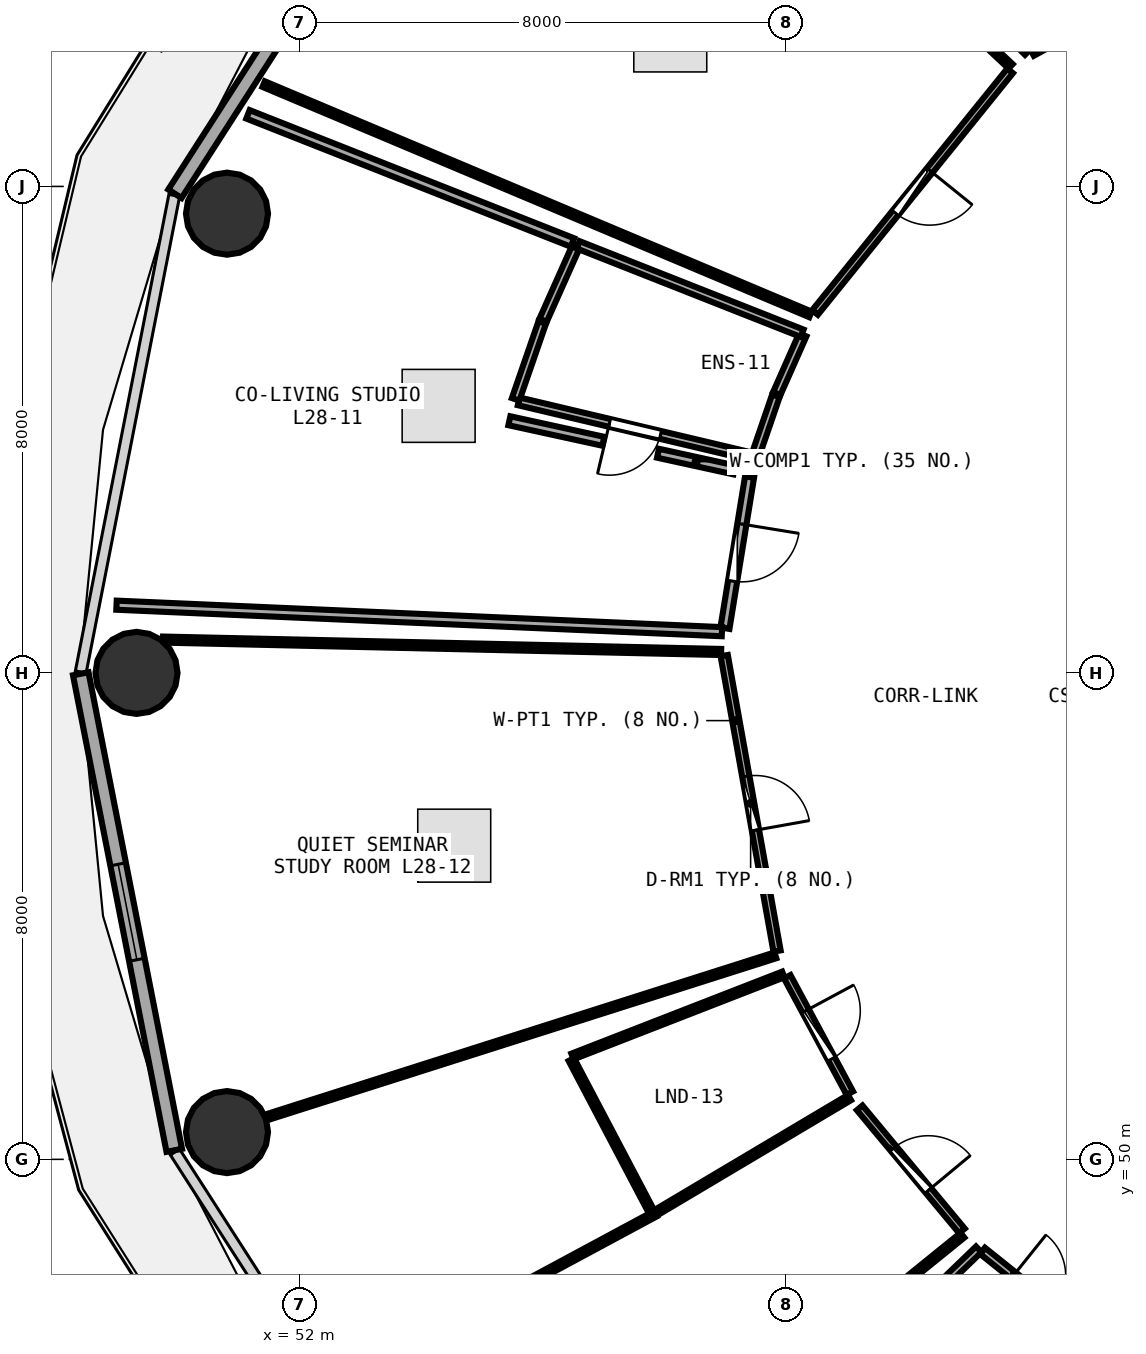
"""IFC4 building model, lengths in metres.
Left out: names, types, materials, properties, quantities, classifications, styles, units other than length and angle.
Written with IfcOpenShell. Run it as: python <this file> out.ifc"""

import sys

from ifc_helpers import new_model, si_unit, direction, frame, frame_2d, origin, origin_2d, place, context, subcontext, project, spatial, rectangle, circle, extrude, element, fill, save


model = new_model("IFC4")
c1 = context("Model", 3, precision=1e-05, world=origin(), true_north=direction((0.0, 1.0)))
c2 = subcontext(c1, "Body", "Model", "MODEL_VIEW")
j1 = project(units=[si_unit("LENGTHUNIT", "METRE"), si_unit("PLANEANGLEUNIT", "RADIAN")], contexts=[c1])
p1 = place(None, origin())
s1 = spatial("IfcSite", under=j1, at=p1, CompositionType="ELEMENT")
p2 = place(p1, origin())
s2 = spatial("IfcBuilding", under=s1, at=p2, CompositionType="ELEMENT")
p3 = place(p2, frame((0.0, 0.0, 110.1)))
s3 = spatial("IfcBuildingStorey", under=s2, at=p3, CompositionType="ELEMENT", Elevation=110.1)
for number, where, z_axis, x_axis in (
    (1, (50.808, 65.552, 0.0), (0.0, 0.0, 1.0), (1.0, 0.0, 0.0)),
    (2, (49.32, 58.0, 0.0), (0.0, 0.0, 1.0), (1.0, 0.0, 0.0)),
    (3, (50.808, 50.448, 0.0), (0.0, 0.0, 1.0), (1.0, 0.0, 0.0)),
):
    element("IfcColumn", number, at=place(p3, frame(where, z_axis=z_axis, x_axis=x_axis)), inside=s3, PredefinedType="COLUMN", context=c2, shape_type="SweptSolid", body=[
        extrude(circle(Radius=0.675, at=origin_2d()), origin(), (0.0, 0.0, 1.0), 3.75),
    ])
p4 = place(p3, frame((54.381, 72.771, 0.0), z_axis=(0.0, 0.0, 1.0), x_axis=(-0.540620528459, -0.841266571432, 0.0)))
e4 = element("IfcWall", 4, at=p4, inside=s3, PredefinedType="SOLIDWALL", context=c2, shape_type="SweptSolid", body=[
    extrude(rectangle(XDim=8.193, YDim=0.26, at=frame_2d((4.096, 0.0))), origin(), (0.0, 0.0, 1.0), 3.475),
])
p5 = place(p4, frame((3.621, 0.0, 0.0)))
e5 = element("IfcOpeningElement", 5, at=p5, cuts=e4, PredefinedType="OPENING", context=c2, shape_type="SweptSolid", body=[
    extrude(rectangle(XDim=0.95, YDim=2.1, at=frame_2d((0.475, 1.05))), frame((0.0, 0.14, 0.0), z_axis=(0.0, -1.0, 0.0), x_axis=(1.0, 0.0, 0.0)), (0.0, 0.0, 1.0), 0.28),
])
p6 = place(p4, frame((2.041, 0.0, 0.85)))
e6 = element("IfcOpeningElement", 6, at=p6, cuts=e4, PredefinedType="OPENING", context=c2, shape_type="SweptSolid", body=[
    extrude(rectangle(XDim=1.2, YDim=1.45, at=frame_2d((0.6, 0.725))), frame((0.0, 0.14, 0.0), z_axis=(0.0, -1.0, 0.0), x_axis=(1.0, 0.0, 0.0)), (0.0, 0.0, 1.0), 0.28),
])
p7 = place(p3, frame((48.403, 57.985, 0.0), z_axis=(0.0, 0.0, 1.0), x_axis=(0.192581843632, -0.981280914674, 0.0)))
e7 = element("IfcWall", 7, at=p7, inside=s3, PredefinedType="SOLIDWALL", context=c2, shape_type="SweptSolid", body=[
    extrude(rectangle(XDim=7.987, YDim=0.26, at=frame_2d((3.993, 0.0))), origin(), (0.0, 0.0, 1.0), 3.475),
])
p8 = place(p7, frame((3.193, 0.0, 0.85)))
e8 = element("IfcOpeningElement", 8, at=p8, cuts=e7, PredefinedType="OPENING", context=c2, shape_type="SweptSolid", body=[
    extrude(rectangle(XDim=1.6, YDim=1.45, at=frame_2d((0.8, 0.725))), frame((0.0, 0.14, 0.0), z_axis=(0.0, -1.0, 0.0), x_axis=(1.0, 0.0, 0.0)), (0.0, 0.0, 1.0), 0.28),
])
p9 = place(p3, frame((68.704, 70.745, 0.0), z_axis=(0.0, 0.0, 1.0), x_axis=(-0.877504886901, -0.479567694351, 0.0)))
e9 = element("IfcWall", 9, at=p9, inside=s3, PredefinedType="PARTITIONING", context=c2, shape_type="SweptSolid", body=[
    extrude(rectangle(XDim=5.306, YDim=0.12, at=frame_2d((2.653, 0.0))), origin(), (0.0, 0.0, 1.0), 2.925),
])
p10 = place(p9, frame((2.203, 0.0, 0.0)))
e10 = element("IfcOpeningElement", 10, at=p10, cuts=e9, PredefinedType="OPENING", context=c2, shape_type="SweptSolid", body=[
    extrude(rectangle(XDim=0.9, YDim=2.08, at=frame_2d((0.45, 1.04))), frame((0.0, 0.07, 0.0), z_axis=(0.0, -1.0, 0.0), x_axis=(1.0, 0.0, 0.0)), (0.0, 0.0, 1.0), 0.14),
])
p11 = place(p3, frame((63.687, 67.9, 0.0), z_axis=(0.0, 0.0, 1.0), x_axis=(-0.628221381111, -0.778034636963, 0.0)))
e11 = element("IfcWall", 11, at=p11, inside=s3, PredefinedType="PARTITIONING", context=c2, shape_type="SweptSolid", body=[
    extrude(rectangle(XDim=5.107, YDim=0.12, at=frame_2d((2.554, 0.0))), origin(), (0.0, 0.0, 1.0), 2.925),
])
p12 = place(p11, frame((2.104, 0.0, 0.0)))
e12 = element("IfcOpeningElement", 12, at=p12, cuts=e11, PredefinedType="OPENING", context=c2, shape_type="SweptSolid", body=[
    extrude(rectangle(XDim=0.9, YDim=2.08, at=frame_2d((0.45, 1.04))), frame((0.0, 0.07, 0.0), z_axis=(0.0, -1.0, 0.0), x_axis=(1.0, 0.0, 0.0)), (0.0, 0.0, 1.0), 0.14),
])
p13 = place(p3, frame((59.43, 61.56, 0.0), z_axis=(0.0, 0.0, 1.0), x_axis=(-0.97309348784, 0.230410641948, 0.0)))
e13 = element("IfcWall", 13, at=p13, inside=s3, PredefinedType="PLUMBINGWALL", context=c2, shape_type="SweptSolid", body=[
    extrude(rectangle(XDim=3.929, YDim=0.13, at=frame_2d((1.964, 0.0))), origin(), (0.0, 0.0, 1.0), 3.175),
])
p14 = place(p13, frame((1.534, 0.0, 0.0)))
e14 = element("IfcOpeningElement", 14, at=p14, cuts=e13, PredefinedType="OPENING", context=c2, shape_type="SweptSolid", body=[
    extrude(rectangle(XDim=0.86, YDim=2.05, at=frame_2d((0.43, 1.025))), frame((0.0, 0.075, 0.0), z_axis=(0.0, -1.0, 0.0), x_axis=(1.0, 0.0, 0.0)), (0.0, 0.0, 1.0), 0.15),
])
p15 = place(p3, frame((59.402, 61.222, 0.0), z_axis=(0.0, 0.0, 1.0), x_axis=(-0.16067340659, -0.987007627334, 0.0)))
e15 = element("IfcWall", 15, at=p15, inside=s3, PredefinedType="PARTITIONING", context=c2, shape_type="SweptSolid", body=[
    extrude(rectangle(XDim=2.519, YDim=0.15, at=frame_2d((1.26, 0.0))), origin(), (0.0, 0.0, 1.0), 3.48),
])
p16 = place(p15, frame((0.785, 0.0, 0.0)))
e16 = element("IfcOpeningElement", 16, at=p16, cuts=e15, PredefinedType="OPENING", context=c2, shape_type="SweptSolid", body=[
    extrude(rectangle(XDim=0.95, YDim=2.08, at=frame_2d((0.475, 1.04))), frame((0.0, 0.085, 0.0), z_axis=(0.0, -1.0, 0.0), x_axis=(1.0, 0.0, 0.0)), (0.0, 0.0, 1.0), 0.17),
])
p17 = place(p3, frame((58.986, 58.284, 0.0), z_axis=(0.0, 0.0, 1.0), x_axis=(0.17606801269, -0.984378004075, 0.0)))
e17 = element("IfcWall", 17, at=p17, inside=s3, PredefinedType="PARTITIONING", context=c2, shape_type="SweptSolid", body=[
    extrude(rectangle(XDim=4.935, YDim=0.12, at=frame_2d((2.468, 0.0))), origin(), (0.0, 0.0, 1.0), 2.925),
])
p18 = place(p17, frame((2.017, 0.0, 0.0)))
e18 = element("IfcOpeningElement", 18, at=p18, cuts=e17, PredefinedType="OPENING", context=c2, shape_type="SweptSolid", body=[
    extrude(rectangle(XDim=0.9, YDim=2.08, at=frame_2d((0.45, 1.04))), frame((0.0, 0.07, 0.0), z_axis=(0.0, -1.0, 0.0), x_axis=(1.0, 0.0, 0.0)), (0.0, 0.0, 1.0), 0.14),
])
p19 = place(p3, frame((60.022, 53.002, 0.0), z_axis=(0.0, 0.0, 1.0), x_axis=(0.473670876771, -0.880701936241, 0.0)))
e19 = element("IfcWall", 19, at=p19, inside=s3, PredefinedType="PARTITIONING", context=c2, shape_type="SweptSolid", body=[
    extrude(rectangle(XDim=2.173, YDim=0.12, at=frame_2d((1.086, 0.0))), origin(), (0.0, 0.0, 1.0), 3.235),
])
p20 = place(p19, frame((0.636, 0.0, 0.0)))
e20 = element("IfcOpeningElement", 20, at=p20, cuts=e19, PredefinedType="OPENING", context=c2, shape_type="SweptSolid", body=[
    extrude(rectangle(XDim=0.9, YDim=2.08, at=frame_2d((0.45, 1.04))), frame((0.0, 0.07, 0.0), z_axis=(0.0, -1.0, 0.0), x_axis=(1.0, 0.0, 0.0)), (0.0, 0.0, 1.0), 0.14),
])
p21 = place(p3, frame((61.213, 50.847, 0.0), z_axis=(0.0, 0.0, 1.0), x_axis=(0.639180120379, -0.769057067916, 0.0)))
e21 = element("IfcWall", 21, at=p21, inside=s3, PredefinedType="PARTITIONING", context=c2, shape_type="SweptSolid", body=[
    extrude(rectangle(XDim=2.632, YDim=0.12, at=frame_2d((1.316, 0.0))), origin(), (0.0, 0.0, 1.0), 2.925),
])
p22 = place(p21, frame((0.866, 0.0, 0.0)))
e22 = element("IfcOpeningElement", 22, at=p22, cuts=e21, PredefinedType="OPENING", context=c2, shape_type="SweptSolid", body=[
    extrude(rectangle(XDim=0.9, YDim=2.08, at=frame_2d((0.45, 1.04))), frame((0.0, 0.07, 0.0), z_axis=(0.0, -1.0, 0.0), x_axis=(1.0, 0.0, 0.0)), (0.0, 0.0, 1.0), 0.14),
])
p23 = place(p3, frame((63.233, 48.497, 0.0), z_axis=(0.0, 0.0, 1.0), x_axis=(0.780097789407, -0.625657605214, 0.0)))
e23 = element("IfcWall", 23, at=p23, inside=s3, PredefinedType="PLUMBINGWALL", context=c2, shape_type="SweptSolid", body=[
    extrude(rectangle(XDim=2.164, YDim=0.13, at=frame_2d((1.082, 0.0))), origin(), (0.0, 0.0, 1.0), 2.925),
])
p24 = place(p23, frame((0.652, 0.0, 0.0)))
e24 = element("IfcOpeningElement", 24, at=p24, cuts=e23, PredefinedType="OPENING", context=c2, shape_type="SweptSolid", body=[
    extrude(rectangle(XDim=0.86, YDim=2.05, at=frame_2d((0.43, 1.025))), frame((0.0, 0.075, 0.0), z_axis=(0.0, -1.0, 0.0), x_axis=(1.0, 0.0, 0.0)), (0.0, 0.0, 1.0), 0.15),
])
p25 = place(p3, frame((63.968, 68.2, 0.0), z_axis=(0.0, 0.0, 1.0), x_axis=(-0.711571842372, 0.702613345406, 0.0)))
e25 = element("IfcWall", 25, at=p25, inside=s3, PredefinedType="PARTITIONING", context=c2, shape_type="SweptSolid", body=[
    extrude(rectangle(XDim=9.32, YDim=0.1, at=frame_2d((4.66, 0.0))), origin(), (0.0, 0.0, 1.0), 2.975),
])
p26 = place(p3, frame((60.404, 63.896, 0.0), z_axis=(0.0, 0.0, 1.0), x_axis=(-0.921616535876, 0.388101740268, 0.0)))
e26 = element("IfcWall", 26, at=p26, inside=s3, PredefinedType="PARTITIONING", context=c2, shape_type="SweptSolid", body=[
    extrude(rectangle(XDim=9.758, YDim=0.1, at=frame_2d((4.879, 0.0))), origin(), (0.0, 0.0, 1.0), 2.925),
])
p27 = place(p3, frame((56.883, 74.379, 0.0), z_axis=(0.0, 0.0, 1.0), x_axis=(0.728610729356, -0.684928029115, 0.0)))
e27 = element("IfcWall", 27, at=p27, inside=s3, PredefinedType="PARTITIONING", context=c2, shape_type="SweptSolid", body=[
    extrude(rectangle(XDim=9.35, YDim=0.1, at=frame_2d((4.675, 0.0))), origin(), (0.0, 0.0, 1.0), 2.975),
])
p28 = place(p3, frame((60.278, 63.56, 0.0), z_axis=(0.0, 0.0, 1.0), x_axis=(-0.405022792184, -0.91430658852, 0.0)))
e28 = element("IfcWall", 28, at=p28, inside=s3, PredefinedType="PLUMBINGWALL", context=c2, shape_type="SweptSolid", body=[
    extrude(rectangle(XDim=1.056, YDim=0.13, at=frame_2d((0.528, 0.0))), origin(), (0.0, 0.0, 1.0), 3.235),
])
p29 = place(p3, frame((59.835, 62.557, 0.0), z_axis=(0.0, 0.0, 1.0), x_axis=(-0.325079768511, -0.945686599305, 0.0)))
e29 = element("IfcWall", 29, at=p29, inside=s3, PredefinedType="PLUMBINGWALL", context=c2, shape_type="SweptSolid", body=[
    extrude(rectangle(XDim=1.049, YDim=0.13, at=frame_2d((0.524, 0.0))), origin(), (0.0, 0.0, 1.0), 3.48),
])
p30 = place(p3, frame((55.554, 62.498, 0.0), z_axis=(0.0, 0.0, 1.0), x_axis=(0.327317350081, 0.944914468265, 0.0)))
e30 = element("IfcWall", 30, at=p30, inside=s3, PredefinedType="PLUMBINGWALL", context=c2, shape_type="SweptSolid", body=[
    extrude(rectangle(XDim=1.338, YDim=0.13, at=frame_2d((0.669, 0.0))), origin(), (0.0, 0.0, 1.0), 3.48),
])
p31 = place(p3, frame((56.007, 63.799, 0.0), z_axis=(0.0, 0.0, 1.0), x_axis=(0.407618441725, 0.913152345431, 0.0)))
e31 = element("IfcWall", 31, at=p31, inside=s3, PredefinedType="PLUMBINGWALL", context=c2, shape_type="SweptSolid", body=[
    extrude(rectangle(XDim=1.346, YDim=0.13, at=frame_2d((0.673, 0.0))), origin(), (0.0, 0.0, 1.0), 3.48),
])
p32 = place(p3, frame((56.583, 65.04, 0.0), z_axis=(0.0, 0.0, 1.0), x_axis=(0.930150236363, -0.367179163072, 0.0)))
e32 = element("IfcWall", 32, at=p32, inside=s3, PredefinedType="PLUMBINGWALL", context=c2, shape_type="SweptSolid", body=[
    extrude(rectangle(XDim=3.961, YDim=0.13, at=frame_2d((1.981, 0.0))), origin(), (0.0, 0.0, 1.0), 3.175),
])
p33 = place(p3, frame((58.948, 58.678, 0.0), z_axis=(0.0, 0.0, 1.0), x_axis=(-0.999044661294, 0.043700855133, 0.0)))
e33 = element("IfcWall", 33, at=p33, inside=s3, PredefinedType="PARTITIONING", context=c2, shape_type="SweptSolid", body=[
    extrude(rectangle(XDim=9.967, YDim=0.15, at=frame_2d((4.983, 0.0))), origin(), (0.0, 0.0, 1.0), 2.975),
])
p34 = place(p3, frame((51.153, 67.185, 0.0), z_axis=(0.0, 0.0, 1.0), x_axis=(0.930084837922, -0.367344789358, 0.0)))
e34 = element("IfcWall", 34, at=p34, inside=s3, PredefinedType="PARTITIONING", context=c2, shape_type="SweptSolid", body=[
    extrude(rectangle(XDim=5.738, YDim=0.15, at=frame_2d((2.869, 0.0))), origin(), (0.0, 0.0, 1.0), 2.925),
])
p35 = place(p3, frame((55.452, 62.146, 0.0), z_axis=(0.0, 0.0, 1.0), x_axis=(0.976922162328, -0.213595619694, 0.0)))
e35 = element("IfcWall", 35, at=p35, inside=s3, PredefinedType="PARTITIONING", context=c2, shape_type="SweptSolid", body=[
    extrude(rectangle(XDim=1.582, YDim=0.15, at=frame_2d((0.791, 0.0))), origin(), (0.0, 0.0, 1.0), 3.175),
])
p36 = place(p3, frame((57.896, 61.612, 0.0), z_axis=(0.0, 0.0, 1.0), x_axis=(0.976918594425, -0.213611937556, 0.0)))
e36 = element("IfcWall", 36, at=p36, inside=s3, PredefinedType="PARTITIONING", context=c2, shape_type="SweptSolid", body=[
    extrude(rectangle(XDim=1.286, YDim=0.15, at=frame_2d((0.643, 0.0))), origin(), (0.0, 0.0, 1.0), 3.48),
])
p37 = place(p3, frame((59.827, 53.355, 0.0), z_axis=(0.0, 0.0, 1.0), x_axis=(-0.952909703193, -0.30325417979, 0.0)))
e37 = element("IfcWall", 37, at=p37, inside=s3, PredefinedType="PARTITIONING", context=c2, shape_type="SweptSolid", body=[
    extrude(rectangle(XDim=8.776, YDim=0.1, at=frame_2d((4.388, 0.0))), origin(), (0.0, 0.0, 1.0), 3.175),
])
p38 = place(p3, frame((49.756, 58.548, 0.0), z_axis=(0.0, 0.0, 1.0), x_axis=(0.999754056426, -0.022177165281, 0.0)))
e38 = element("IfcWall", 38, at=p38, inside=s3, PredefinedType="PARTITIONING", context=c2, shape_type="SweptSolid", body=[
    extrude(rectangle(XDim=9.181, YDim=0.1, at=frame_2d((4.591, 0.0))), origin(), (0.0, 0.0, 1.0), 3.175),
])
p39 = place(p3, frame((61.046, 51.016, 0.0), z_axis=(0.0, 0.0, 1.0), x_axis=(-0.859598985467, -0.510969259529, 0.0)))
e39 = element("IfcWall", 39, at=p39, inside=s3, PredefinedType="PARTITIONING", context=c2, shape_type="SweptSolid", body=[
    extrude(rectangle(XDim=3.721, YDim=0.1, at=frame_2d((1.86, 0.0))), origin(), (0.0, 0.0, 1.0), 2.925),
])
p40 = place(p3, frame((57.794, 49.129, 0.0), z_axis=(0.0, 0.0, 1.0), x_axis=(-0.465895277078, 0.884839867319, 0.0)))
e40 = element("IfcWall", 40, at=p40, inside=s3, PredefinedType="PARTITIONING", context=c2, shape_type="SweptSolid", body=[
    extrude(rectangle(XDim=2.839, YDim=0.1, at=frame_2d((1.419, 0.0))), origin(), (0.0, 0.0, 1.0), 2.925),
])
p41 = place(p3, frame((56.49, 51.691, 0.0), z_axis=(0.0, 0.0, 1.0), x_axis=(0.931912263443, 0.362683792365, 0.0)))
e41 = element("IfcWall", 41, at=p41, inside=s3, PredefinedType="PARTITIONING", context=c2, shape_type="SweptSolid", body=[
    extrude(rectangle(XDim=3.72, YDim=0.1, at=frame_2d((1.86, 0.0))), origin(), (0.0, 0.0, 1.0), 3.175),
])
p42 = place(p3, frame((62.903, 48.752, 0.0), z_axis=(0.0, 0.0, 1.0), x_axis=(-0.777323765608, -0.629100757766, 0.0)))
e42 = element("IfcWall", 42, at=p42, inside=s3, PredefinedType="PARTITIONING", context=c2, shape_type="SweptSolid", body=[
    extrude(rectangle(XDim=9.44, YDim=0.1, at=frame_2d((4.72, 0.0))), origin(), (0.0, 0.0, 1.0), 2.925),
])
p43 = place(p3, frame((52.634, 46.298, 0.0), z_axis=(0.0, 0.0, 1.0), x_axis=(0.880653600526, 0.473760736956, 0.0)))
e43 = element("IfcWall", 43, at=p43, inside=s3, PredefinedType="PARTITIONING", context=c2, shape_type="SweptSolid", body=[
    extrude(rectangle(XDim=5.926, YDim=0.1, at=frame_2d((2.963, 0.0))), origin(), (0.0, 0.0, 1.0), 2.975),
])
p44 = place(p3, frame((60.753, 46.187, 0.0), z_axis=(0.0, 0.0, 1.0), x_axis=(0.719671825867, 0.694314383441, 0.0)))
e44 = element("IfcWall", 44, at=p44, inside=s3, PredefinedType="PLUMBINGWALL", context=c2, shape_type="SweptSolid", body=[
    extrude(rectangle(XDim=3.36, YDim=0.13, at=frame_2d((1.68, 0.0))), origin(), (0.0, 0.0, 1.0), 3.235),
])
p45 = place(p8, origin())
e45 = element("IfcWindow", 45, at=p45, inside=s3, PartitioningType="SINGLE_PANEL", PredefinedType="WINDOW", context=c2, shape_type="SweptSolid", body=[
    extrude(rectangle(XDim=1.6, YDim=1.45, at=frame_2d((0.8, 0.725))), frame((0.0, 0.03, 0.0), z_axis=(0.0, -1.0, 0.0), x_axis=(1.0, 0.0, 0.0)), (0.0, 0.0, 1.0), 0.06),
])
fill(e8, e45)
p46 = place(p12, origin())
e46 = element("IfcDoor", 46, at=p46, inside=s3, OperationType="SINGLE_SWING_LEFT", PredefinedType="DOOR", context=c2, shape_type="SweptSolid", body=[
    extrude(rectangle(XDim=0.9, YDim=2.08, at=frame_2d((0.45, 1.04))), frame((0.0, 0.025, 0.0), z_axis=(0.0, -1.0, 0.0), x_axis=(1.0, 0.0, 0.0)), (0.0, 0.0, 1.0), 0.05),
])
fill(e12, e46)
p47 = place(p14, origin())
e47 = element("IfcDoor", 47, at=p47, inside=s3, OperationType="SINGLE_SWING_RIGHT", PredefinedType="DOOR", context=c2, shape_type="SweptSolid", body=[
    extrude(rectangle(XDim=0.86, YDim=2.05, at=frame_2d((0.43, 1.025))), frame((0.0, 0.025, 0.0), z_axis=(0.0, -1.0, 0.0), x_axis=(1.0, 0.0, 0.0)), (0.0, 0.0, 1.0), 0.05),
])
fill(e14, e47)
p48 = place(p16, origin())
e48 = element("IfcDoor", 48, at=p48, inside=s3, OperationType="SINGLE_SWING_LEFT", PredefinedType="DOOR", context=c2, shape_type="SweptSolid", body=[
    extrude(rectangle(XDim=0.95, YDim=2.08, at=frame_2d((0.475, 1.04))), frame((0.0, 0.025, 0.0), z_axis=(0.0, -1.0, 0.0), x_axis=(1.0, 0.0, 0.0)), (0.0, 0.0, 1.0), 0.05),
])
fill(e16, e48)
p49 = place(p18, origin())
e49 = element("IfcDoor", 49, at=p49, inside=s3, OperationType="SINGLE_SWING_RIGHT", PredefinedType="DOOR", context=c2, shape_type="SweptSolid", body=[
    extrude(rectangle(XDim=0.9, YDim=2.08, at=frame_2d((0.45, 1.04))), frame((0.0, 0.025, 0.0), z_axis=(0.0, -1.0, 0.0), x_axis=(1.0, 0.0, 0.0)), (0.0, 0.0, 1.0), 0.05),
])
fill(e18, e49)
p50 = place(p20, origin())
e50 = element("IfcDoor", 50, at=p50, inside=s3, OperationType="SINGLE_SWING_LEFT", PredefinedType="DOOR", context=c2, shape_type="SweptSolid", body=[
    extrude(rectangle(XDim=0.9, YDim=2.08, at=frame_2d((0.45, 1.04))), frame((0.0, 0.025, 0.0), z_axis=(0.0, -1.0, 0.0), x_axis=(1.0, 0.0, 0.0)), (0.0, 0.0, 1.0), 0.05),
])
fill(e20, e50)
p51 = place(p22, origin())
e51 = element("IfcDoor", 51, at=p51, inside=s3, OperationType="SINGLE_SWING_RIGHT", PredefinedType="DOOR", context=c2, shape_type="SweptSolid", body=[
    extrude(rectangle(XDim=0.9, YDim=2.08, at=frame_2d((0.45, 1.04))), frame((0.0, 0.025, 0.0), z_axis=(0.0, -1.0, 0.0), x_axis=(1.0, 0.0, 0.0)), (0.0, 0.0, 1.0), 0.05),
])
fill(e22, e51)
p52 = place(p24, origin())
e52 = element("IfcDoor", 52, at=p52, inside=s3, OperationType="SINGLE_SWING_LEFT", PredefinedType="DOOR", context=c2, shape_type="SweptSolid", body=[
    extrude(rectangle(XDim=0.86, YDim=2.05, at=frame_2d((0.43, 1.025))), frame((0.0, 0.025, 0.0), z_axis=(0.0, -1.0, 0.0), x_axis=(1.0, 0.0, 0.0)), (0.0, 0.0, 1.0), 0.05),
])
fill(e24, e52)
save(model, sys.argv[1])
